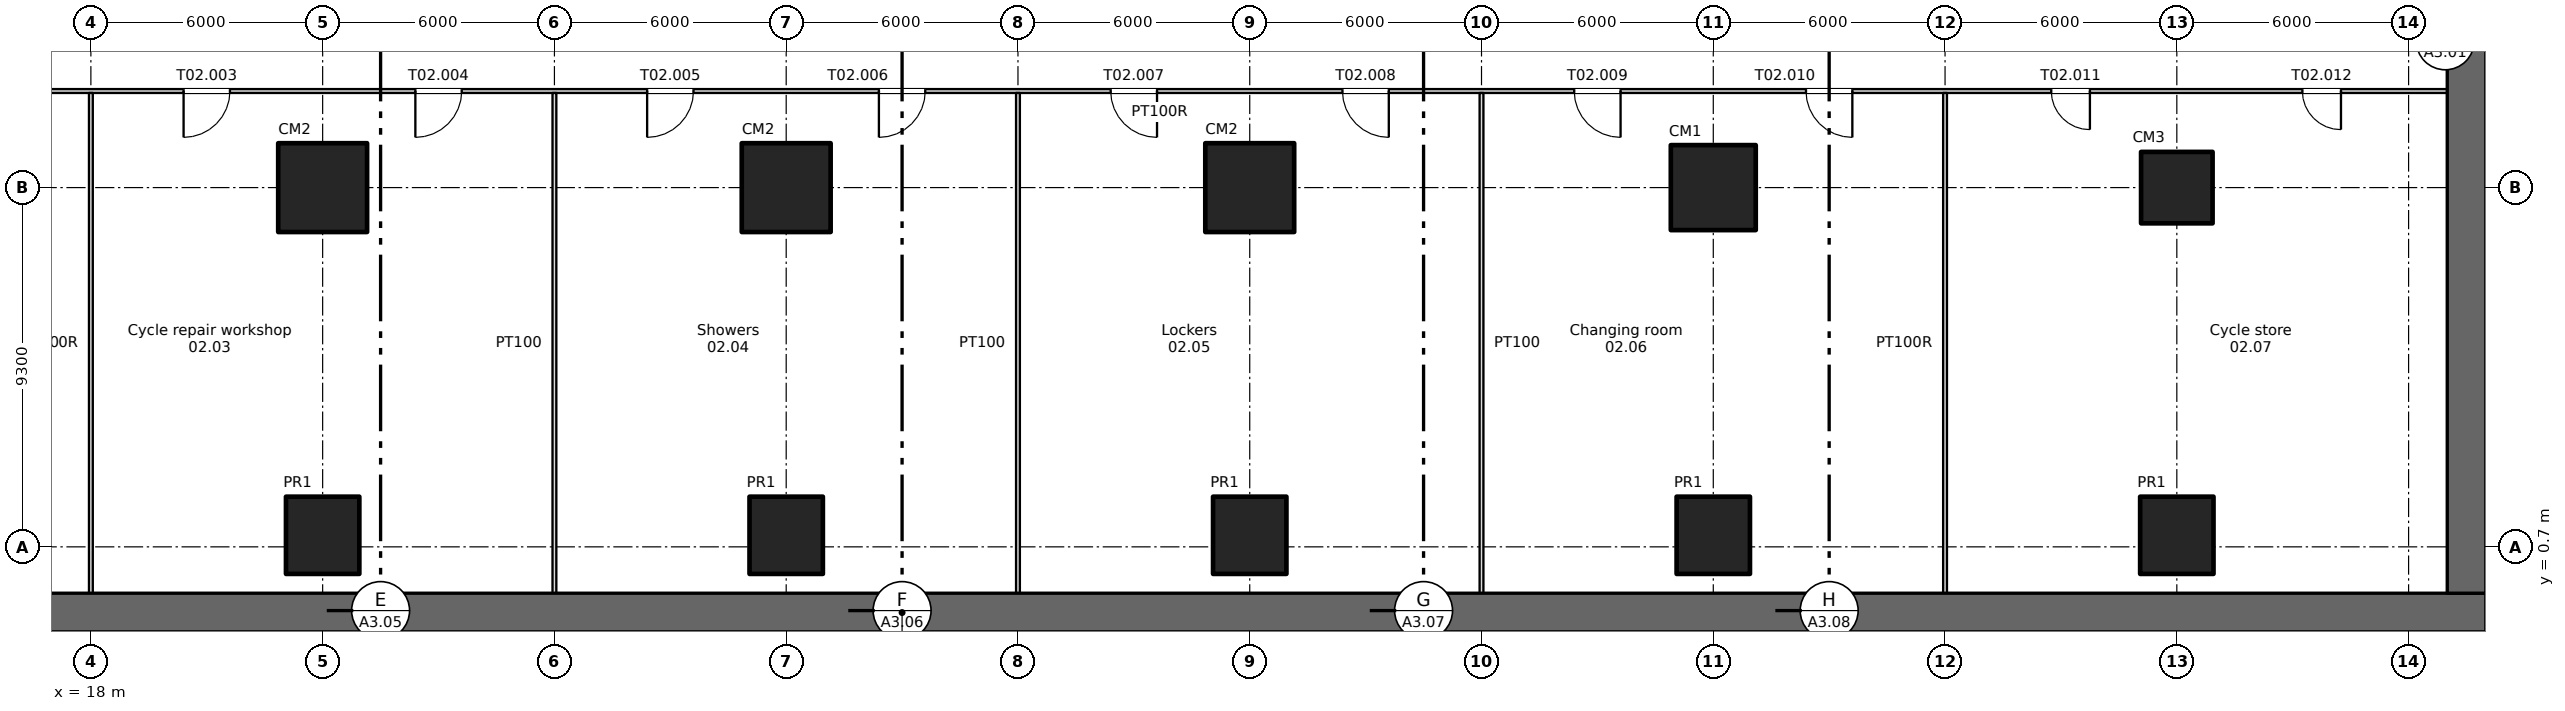
"""IFC4 building model, lengths in metres.
Left out: names, types, materials, properties, quantities, classifications, styles, units other than length and angle.
Written with IfcOpenShell. Run it as: python <this file> out.ifc"""

import sys

from ifc_helpers import new_model, si_unit, direction, frame, frame_2d, origin, origin_2d, place, context, subcontext, project, spatial, rectangle, extrude, element, fill, save


model = new_model("IFC4")
c1 = context("Model", 3, precision=1e-05, world=origin(), true_north=direction((0.0, 1.0)))
c2 = subcontext(c1, "Body", "Model", "MODEL_VIEW")
j1 = project(units=[si_unit("LENGTHUNIT", "METRE"), si_unit("PLANEANGLEUNIT", "RADIAN")], contexts=[c1])
p1 = place(None, origin())
s1 = spatial("IfcSite", under=j1, at=p1, CompositionType="ELEMENT")
p2 = place(p1, origin())
s2 = spatial("IfcBuilding", under=s1, at=p2, CompositionType="ELEMENT")
p3 = place(p2, frame((0.0, 0.0, -6.0)))
s3 = spatial("IfcBuildingStorey", under=s2, at=p3, CompositionType="ELEMENT", Elevation=-6.0)
p4 = place(p3, frame((-2.0, -1.0, 0.0), z_axis=(0.0, 0.0, 1.0), x_axis=(1.0, 0.0, 0.0)))
e1 = element("IfcWall", 1, at=p4, inside=s3, PredefinedType="SOLIDWALL", context=c2, shape_type="SweptSolid", body=[
    extrude(rectangle(XDim=82.0, YDim=1.0, at=frame_2d((41.0, 0.0))), origin(), (0.0, 0.0, 1.0), 5.55),
])
p5 = place(p3, frame((79.5, -0.5, 0.0), z_axis=(0.0, 0.0, 1.0), x_axis=(0.0, 1.0, 0.0)))
e2 = element("IfcWall", 2, at=p5, inside=s3, PredefinedType="SOLIDWALL", context=c2, shape_type="SweptSolid", body=[
    extrude(rectangle(XDim=46.0, YDim=1.0, at=frame_2d((23.0, 0.0))), origin(), (0.0, 0.0, 1.0), 5.55),
])
for number, where, z_axis, x_axis in (
    (3, (24.0, 1.0, 0.0), (0.0, 0.0, 1.0), (1.0, 0.0, 0.0)),
    (4, (36.0, 1.0, 0.0), (0.0, 0.0, 1.0), (1.0, 0.0, 0.0)),
    (5, (48.0, 1.0, 0.0), (0.0, 0.0, 1.0), (1.0, 0.0, 0.0)),
    (6, (60.0, 1.0, 0.0), (0.0, 0.0, 1.0), (1.0, 0.0, 0.0)),
    (7, (72.0, 1.0, 0.0), (0.0, 0.0, 1.0), (1.0, 0.0, 0.0)),
):
    element("IfcColumn", number, at=place(p3, frame(where, z_axis=z_axis, x_axis=x_axis)), inside=s3, PredefinedType="COLUMN", context=c2, shape_type="SweptSolid", body=[
        extrude(rectangle(XDim=1.9, YDim=2.0, at=origin_2d()), origin(), (0.0, 0.0, 1.0), 5.55),
    ])
for number, where, z_axis, x_axis in (
    (8, (24.0, 10.0, 0.0), (0.0, 0.0, 1.0), (1.0, 0.0, 0.0)),
    (9, (36.0, 10.0, 0.0), (0.0, 0.0, 1.0), (1.0, 0.0, 0.0)),
    (10, (48.0, 10.0, 0.0), (0.0, 0.0, 1.0), (1.0, 0.0, 0.0)),
):
    element("IfcColumn", number, at=place(p3, frame(where, z_axis=z_axis, x_axis=x_axis)), inside=s3, PredefinedType="COLUMN", context=c2, shape_type="SweptSolid", body=[
        extrude(rectangle(XDim=2.3, YDim=2.3, at=origin_2d()), origin(), (0.0, 0.0, 1.0), 5.55),
    ])
p6 = place(p3, frame((60.0, 10.0, 0.0), z_axis=(0.0, 0.0, 1.0), x_axis=(1.0, 0.0, 0.0)))
e11 = element("IfcColumn", 11, at=p6, inside=s3, PredefinedType="COLUMN", context=c2, shape_type="SweptSolid", body=[
    extrude(rectangle(XDim=2.2, YDim=2.2, at=origin_2d()), origin(), (0.0, 0.0, 1.0), 5.55),
])
p7 = place(p3, frame((72.0, 10.0, 0.0), z_axis=(0.0, 0.0, 1.0), x_axis=(1.0, 0.0, 0.0)))
e12 = element("IfcColumn", 12, at=p7, inside=s3, PredefinedType="COLUMN", context=c2, shape_type="SweptSolid", body=[
    extrude(rectangle(XDim=1.85, YDim=1.85, at=origin_2d()), origin(), (0.0, 0.0, 1.0), 5.55),
])
p8 = place(p3, frame((-1.0, 12.5, 0.0), z_axis=(0.0, 0.0, 1.0), x_axis=(1.0, 0.0, 0.0)))
e13 = element("IfcWall", 13, at=p8, inside=s3, PredefinedType="PARTITIONING", context=c2, shape_type="SweptSolid", body=[
    extrude(rectangle(XDim=80.0, YDim=0.1, at=frame_2d((40.0, 0.0))), origin(), (0.0, 0.0, 1.0), 5.55),
])
p9 = place(p8, frame((4.25, 0.0, 0.0)))
e14 = element("IfcOpeningElement", 14, at=p9, cuts=e13, PredefinedType="OPENING", context=c2, shape_type="SweptSolid", body=[
    extrude(rectangle(XDim=1.0, YDim=2.1, at=frame_2d((0.5, 1.05))), frame((0.0, 0.06, 0.0), z_axis=(0.0, -1.0, 0.0), x_axis=(1.0, 0.0, 0.0)), (0.0, 0.0, 1.0), 0.12),
])
p10 = place(p8, frame((13.75, 0.0, 0.0)))
e15 = element("IfcOpeningElement", 15, at=p10, cuts=e13, PredefinedType="OPENING", context=c2, shape_type="SweptSolid", body=[
    extrude(rectangle(XDim=1.0, YDim=2.1, at=frame_2d((0.5, 1.05))), frame((0.0, 0.06, 0.0), z_axis=(0.0, -1.0, 0.0), x_axis=(1.0, 0.0, 0.0)), (0.0, 0.0, 1.0), 0.12),
])
p11 = place(p8, frame((21.4, 0.0, 0.0)))
e16 = element("IfcOpeningElement", 16, at=p11, cuts=e13, PredefinedType="OPENING", context=c2, shape_type="SweptSolid", body=[
    extrude(rectangle(XDim=1.2, YDim=2.1, at=frame_2d((0.6, 1.05))), frame((0.0, 0.06, 0.0), z_axis=(0.0, -1.0, 0.0), x_axis=(1.0, 0.0, 0.0)), (0.0, 0.0, 1.0), 0.12),
])
p12 = place(p8, frame((27.4, 0.0, 0.0)))
e17 = element("IfcOpeningElement", 17, at=p12, cuts=e13, PredefinedType="OPENING", context=c2, shape_type="SweptSolid", body=[
    extrude(rectangle(XDim=1.2, YDim=2.1, at=frame_2d((0.6, 1.05))), frame((0.0, 0.06, 0.0), z_axis=(0.0, -1.0, 0.0), x_axis=(1.0, 0.0, 0.0)), (0.0, 0.0, 1.0), 0.12),
])
p13 = place(p8, frame((33.4, 0.0, 0.0)))
e18 = element("IfcOpeningElement", 18, at=p13, cuts=e13, PredefinedType="OPENING", context=c2, shape_type="SweptSolid", body=[
    extrude(rectangle(XDim=1.2, YDim=2.1, at=frame_2d((0.6, 1.05))), frame((0.0, 0.06, 0.0), z_axis=(0.0, -1.0, 0.0), x_axis=(1.0, 0.0, 0.0)), (0.0, 0.0, 1.0), 0.12),
])
p14 = place(p8, frame((39.4, 0.0, 0.0)))
e19 = element("IfcOpeningElement", 19, at=p14, cuts=e13, PredefinedType="OPENING", context=c2, shape_type="SweptSolid", body=[
    extrude(rectangle(XDim=1.2, YDim=2.1, at=frame_2d((0.6, 1.05))), frame((0.0, 0.06, 0.0), z_axis=(0.0, -1.0, 0.0), x_axis=(1.0, 0.0, 0.0)), (0.0, 0.0, 1.0), 0.12),
])
p15 = place(p8, frame((45.4, 0.0, 0.0)))
e20 = element("IfcOpeningElement", 20, at=p15, cuts=e13, PredefinedType="OPENING", context=c2, shape_type="SweptSolid", body=[
    extrude(rectangle(XDim=1.2, YDim=2.1, at=frame_2d((0.6, 1.05))), frame((0.0, 0.06, 0.0), z_axis=(0.0, -1.0, 0.0), x_axis=(1.0, 0.0, 0.0)), (0.0, 0.0, 1.0), 0.12),
])
p16 = place(p8, frame((51.4, 0.0, 0.0)))
e21 = element("IfcOpeningElement", 21, at=p16, cuts=e13, PredefinedType="OPENING", context=c2, shape_type="SweptSolid", body=[
    extrude(rectangle(XDim=1.2, YDim=2.1, at=frame_2d((0.6, 1.05))), frame((0.0, 0.06, 0.0), z_axis=(0.0, -1.0, 0.0), x_axis=(1.0, 0.0, 0.0)), (0.0, 0.0, 1.0), 0.12),
])
p17 = place(p8, frame((57.4, 0.0, 0.0)))
e22 = element("IfcOpeningElement", 22, at=p17, cuts=e13, PredefinedType="OPENING", context=c2, shape_type="SweptSolid", body=[
    extrude(rectangle(XDim=1.2, YDim=2.1, at=frame_2d((0.6, 1.05))), frame((0.0, 0.06, 0.0), z_axis=(0.0, -1.0, 0.0), x_axis=(1.0, 0.0, 0.0)), (0.0, 0.0, 1.0), 0.12),
])
p18 = place(p8, frame((63.4, 0.0, 0.0)))
e23 = element("IfcOpeningElement", 23, at=p18, cuts=e13, PredefinedType="OPENING", context=c2, shape_type="SweptSolid", body=[
    extrude(rectangle(XDim=1.2, YDim=2.1, at=frame_2d((0.6, 1.05))), frame((0.0, 0.06, 0.0), z_axis=(0.0, -1.0, 0.0), x_axis=(1.0, 0.0, 0.0)), (0.0, 0.0, 1.0), 0.12),
])
p19 = place(p8, frame((69.75, 0.0, 0.0)))
e24 = element("IfcOpeningElement", 24, at=p19, cuts=e13, PredefinedType="OPENING", context=c2, shape_type="SweptSolid", body=[
    extrude(rectangle(XDim=1.0, YDim=2.1, at=frame_2d((0.5, 1.05))), frame((0.0, 0.06, 0.0), z_axis=(0.0, -1.0, 0.0), x_axis=(1.0, 0.0, 0.0)), (0.0, 0.0, 1.0), 0.12),
])
p20 = place(p8, frame((76.25, 0.0, 0.0)))
e25 = element("IfcOpeningElement", 25, at=p20, cuts=e13, PredefinedType="OPENING", context=c2, shape_type="SweptSolid", body=[
    extrude(rectangle(XDim=1.0, YDim=2.1, at=frame_2d((0.5, 1.05))), frame((0.0, 0.06, 0.0), z_axis=(0.0, -1.0, 0.0), x_axis=(1.0, 0.0, 0.0)), (0.0, 0.0, 1.0), 0.12),
])
for number, where, z_axis, x_axis in (
    (26, (18.0, -0.5, 0.0), (0.0, 0.0, 1.0), (0.0, 1.0, 0.0)),
    (27, (30.0, -0.5, 0.0), (0.0, 0.0, 1.0), (0.0, 1.0, 0.0)),
    (28, (42.0, -0.5, 0.0), (0.0, 0.0, 1.0), (0.0, 1.0, 0.0)),
    (29, (54.0, -0.5, 0.0), (0.0, 0.0, 1.0), (0.0, 1.0, 0.0)),
    (30, (66.0, -0.5, 0.0), (0.0, 0.0, 1.0), (0.0, 1.0, 0.0)),
):
    element("IfcWall", number, at=place(p3, frame(where, z_axis=z_axis, x_axis=x_axis)), inside=s3, PredefinedType="PARTITIONING", context=c2, shape_type="SweptSolid", body=[
        extrude(rectangle(XDim=12.95, YDim=0.1, at=frame_2d((6.475, 0.0))), origin(), (0.0, 0.0, 1.0), 5.55),
    ])
p21 = place(p11, origin())
e31 = element("IfcDoor", 31, at=p21, inside=s3, OperationType="SINGLE_SWING_LEFT", PredefinedType="DOOR", context=c2, shape_type="SweptSolid", body=[
    extrude(rectangle(XDim=1.2, YDim=2.1, at=frame_2d((0.6, 1.05))), frame((0.0, 0.025, 0.0), z_axis=(0.0, -1.0, 0.0), x_axis=(1.0, 0.0, 0.0)), (0.0, 0.0, 1.0), 0.05),
])
fill(e16, e31)
p22 = place(p12, origin())
e32 = element("IfcDoor", 32, at=p22, inside=s3, OperationType="SINGLE_SWING_LEFT", PredefinedType="DOOR", context=c2, shape_type="SweptSolid", body=[
    extrude(rectangle(XDim=1.2, YDim=2.1, at=frame_2d((0.6, 1.05))), frame((0.0, 0.025, 0.0), z_axis=(0.0, -1.0, 0.0), x_axis=(1.0, 0.0, 0.0)), (0.0, 0.0, 1.0), 0.05),
])
fill(e17, e32)
p23 = place(p13, origin())
e33 = element("IfcDoor", 33, at=p23, inside=s3, OperationType="SINGLE_SWING_LEFT", PredefinedType="DOOR", context=c2, shape_type="SweptSolid", body=[
    extrude(rectangle(XDim=1.2, YDim=2.1, at=frame_2d((0.6, 1.05))), frame((0.0, 0.025, 0.0), z_axis=(0.0, -1.0, 0.0), x_axis=(1.0, 0.0, 0.0)), (0.0, 0.0, 1.0), 0.05),
])
fill(e18, e33)
p24 = place(p14, origin())
e34 = element("IfcDoor", 34, at=p24, inside=s3, OperationType="SINGLE_SWING_LEFT", PredefinedType="DOOR", context=c2, shape_type="SweptSolid", body=[
    extrude(rectangle(XDim=1.2, YDim=2.1, at=frame_2d((0.6, 1.05))), frame((0.0, 0.025, 0.0), z_axis=(0.0, -1.0, 0.0), x_axis=(1.0, 0.0, 0.0)), (0.0, 0.0, 1.0), 0.05),
])
fill(e19, e34)
p25 = place(p15, origin())
e35 = element("IfcDoor", 35, at=p25, inside=s3, OperationType="SINGLE_SWING_RIGHT", PredefinedType="DOOR", context=c2, shape_type="SweptSolid", body=[
    extrude(rectangle(XDim=1.2, YDim=2.1, at=frame_2d((0.6, 1.05))), frame((0.0, 0.025, 0.0), z_axis=(0.0, -1.0, 0.0), x_axis=(1.0, 0.0, 0.0)), (0.0, 0.0, 1.0), 0.05),
])
fill(e20, e35)
p26 = place(p16, origin())
e36 = element("IfcDoor", 36, at=p26, inside=s3, OperationType="SINGLE_SWING_RIGHT", PredefinedType="DOOR", context=c2, shape_type="SweptSolid", body=[
    extrude(rectangle(XDim=1.2, YDim=2.1, at=frame_2d((0.6, 1.05))), frame((0.0, 0.025, 0.0), z_axis=(0.0, -1.0, 0.0), x_axis=(1.0, 0.0, 0.0)), (0.0, 0.0, 1.0), 0.05),
])
fill(e21, e36)
p27 = place(p17, origin())
e37 = element("IfcDoor", 37, at=p27, inside=s3, OperationType="SINGLE_SWING_RIGHT", PredefinedType="DOOR", context=c2, shape_type="SweptSolid", body=[
    extrude(rectangle(XDim=1.2, YDim=2.1, at=frame_2d((0.6, 1.05))), frame((0.0, 0.025, 0.0), z_axis=(0.0, -1.0, 0.0), x_axis=(1.0, 0.0, 0.0)), (0.0, 0.0, 1.0), 0.05),
])
fill(e22, e37)
p28 = place(p18, origin())
e38 = element("IfcDoor", 38, at=p28, inside=s3, OperationType="SINGLE_SWING_RIGHT", PredefinedType="DOOR", context=c2, shape_type="SweptSolid", body=[
    extrude(rectangle(XDim=1.2, YDim=2.1, at=frame_2d((0.6, 1.05))), frame((0.0, 0.025, 0.0), z_axis=(0.0, -1.0, 0.0), x_axis=(1.0, 0.0, 0.0)), (0.0, 0.0, 1.0), 0.05),
])
fill(e23, e38)
p29 = place(p19, origin())
e39 = element("IfcDoor", 39, at=p29, inside=s3, OperationType="SINGLE_SWING_RIGHT", PredefinedType="DOOR", context=c2, shape_type="SweptSolid", body=[
    extrude(rectangle(XDim=1.0, YDim=2.1, at=frame_2d((0.5, 1.05))), frame((0.0, 0.025, 0.0), z_axis=(0.0, -1.0, 0.0), x_axis=(1.0, 0.0, 0.0)), (0.0, 0.0, 1.0), 0.05),
])
fill(e24, e39)
p30 = place(p20, origin())
e40 = element("IfcDoor", 40, at=p30, inside=s3, OperationType="SINGLE_SWING_RIGHT", PredefinedType="DOOR", context=c2, shape_type="SweptSolid", body=[
    extrude(rectangle(XDim=1.0, YDim=2.1, at=frame_2d((0.5, 1.05))), frame((0.0, 0.025, 0.0), z_axis=(0.0, -1.0, 0.0), x_axis=(1.0, 0.0, 0.0)), (0.0, 0.0, 1.0), 0.05),
])
fill(e25, e40)
save(model, sys.argv[1])
